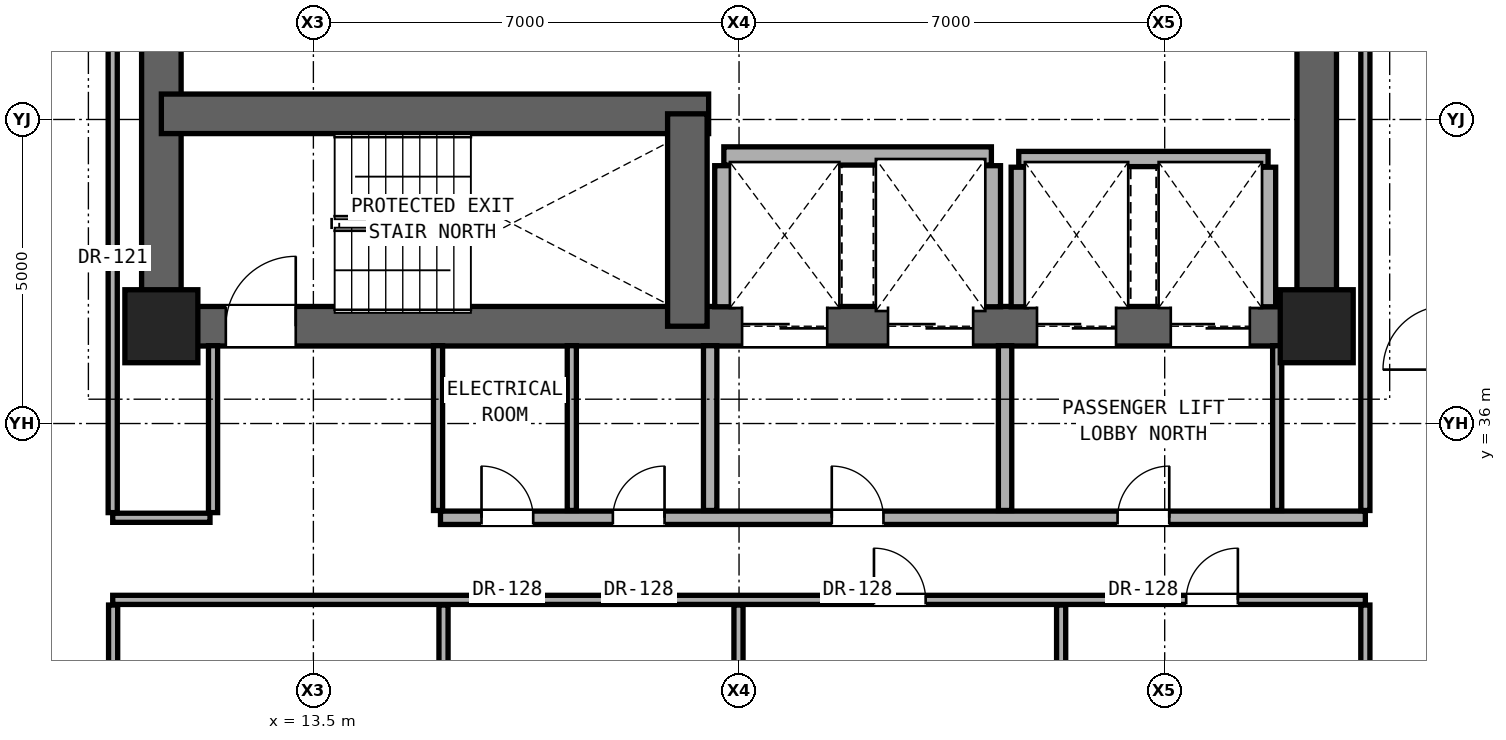
"""IFC4 building model, lengths in metres.
Left out: names, types, materials, properties, quantities, classifications, styles, units other than length and angle.
Written with IfcOpenShell. Run it as: python <this file> out.ifc"""

import sys

from ifc_helpers import new_model, si_unit, direction, frame, frame_2d, origin, origin_2d, place, context, subcontext, project, spatial, rectangle, extrude, element, fill, save


model = new_model("IFC4")
c1 = context("Model", 3, precision=1e-05, world=origin(), true_north=direction((0.0, 1.0)))
c2 = subcontext(c1, "Body", "Model", "MODEL_VIEW")
j1 = project(units=[si_unit("LENGTHUNIT", "METRE"), si_unit("PLANEANGLEUNIT", "RADIAN")], contexts=[c1])
p1 = place(None, origin())
s1 = spatial("IfcSite", under=j1, at=p1, CompositionType="ELEMENT")
p2 = place(p1, origin())
s2 = spatial("IfcBuilding", under=s1, at=p2, CompositionType="ELEMENT")
p3 = place(p2, frame((0.0, 0.0, 91.7)))
s3 = spatial("IfcBuildingStorey", under=s2, at=p3, CompositionType="ELEMENT", Elevation=91.7)
for number, where, z_axis, x_axis in (
    (1, (11.0, 37.6, 0.0), (0.0, 0.0, 1.0), (1.0, 0.0, 0.0)),
    (2, (30.0, 37.6, 0.0), (0.0, 0.0, 1.0), (1.0, 0.0, 0.0)),
):
    element("IfcColumn", number, at=place(p3, frame(where, z_axis=z_axis, x_axis=x_axis)), inside=s3, PredefinedType="COLUMN", context=c2, shape_type="SweptSolid", body=[
        extrude(rectangle(XDim=1.2, YDim=1.2, at=origin_2d()), origin(), (0.0, 0.0, 1.0), 3.3),
    ])
for number, where, z_axis, x_axis in (
    (3, (11.0, 37.6, 0.0), (0.0, 0.0, 1.0), (0.0, 1.0, 0.0)),
    (4, (30.0, 37.6, 0.0), (0.0, 0.0, 1.0), (0.0, 1.0, 0.0)),
):
    element("IfcWall", number, at=place(p3, frame(where, z_axis=z_axis, x_axis=x_axis)), inside=s3, PredefinedType="SHEAR", context=c2, shape_type="SweptSolid", body=[
        extrude(rectangle(XDim=6.0, YDim=0.65, at=frame_2d((3.0, 0.0))), origin(), (0.0, 0.0, 1.0), 3.08),
    ])
p4 = place(p3, frame((11.0, 37.6, 0.0), z_axis=(0.0, 0.0, 1.0), x_axis=(1.0, 0.0, 0.0)))
e5 = element("IfcWall", 5, at=p4, inside=s3, PredefinedType="SHEAR", context=c2, shape_type="SweptSolid", body=[
    extrude(rectangle(XDim=19.0, YDim=0.65, at=frame_2d((9.5, 0.0))), origin(), (0.0, 0.0, 1.0), 3.08),
])
p5 = place(p4, frame((1.06, 0.0, 0.0)))
e6 = element("IfcOpeningElement", 6, at=p5, cuts=e5, PredefinedType="OPENING", context=c2, shape_type="SweptSolid", body=[
    extrude(rectangle(XDim=1.15, YDim=2.2, at=frame_2d((0.575, 1.1))), frame((0.0, 0.335, 0.0), z_axis=(0.0, -1.0, 0.0), x_axis=(1.0, 0.0, 0.0)), (0.0, 0.0, 1.0), 0.67),
])
p6 = place(p4, frame((9.55, 0.0, 0.0)))
e7 = element("IfcOpeningElement", 7, at=p6, cuts=e5, PredefinedType="OPENING", context=c2, shape_type="SweptSolid", body=[
    extrude(rectangle(XDim=1.4, YDim=2.35, at=frame_2d((0.7, 1.175))), frame((0.0, 0.335, 0.0), z_axis=(0.0, -1.0, 0.0), x_axis=(1.0, 0.0, 0.0)), (0.0, 0.0, 1.0), 0.67),
])
p7 = place(p4, frame((11.95, 0.0, 0.0)))
e8 = element("IfcOpeningElement", 8, at=p7, cuts=e5, PredefinedType="OPENING", context=c2, shape_type="SweptSolid", body=[
    extrude(rectangle(XDim=1.4, YDim=2.35, at=frame_2d((0.7, 1.175))), frame((0.0, 0.335, 0.0), z_axis=(0.0, -1.0, 0.0), x_axis=(1.0, 0.0, 0.0)), (0.0, 0.0, 1.0), 0.67),
])
p8 = place(p4, frame((14.4, 0.0, 0.0)))
e9 = element("IfcOpeningElement", 9, at=p8, cuts=e5, PredefinedType="OPENING", context=c2, shape_type="SweptSolid", body=[
    extrude(rectangle(XDim=1.3, YDim=2.3, at=frame_2d((0.65, 1.15))), frame((0.0, 0.335, 0.0), z_axis=(0.0, -1.0, 0.0), x_axis=(1.0, 0.0, 0.0)), (0.0, 0.0, 1.0), 0.67),
])
p9 = place(p4, frame((16.6, 0.0, 0.0)))
e10 = element("IfcOpeningElement", 10, at=p9, cuts=e5, PredefinedType="OPENING", context=c2, shape_type="SweptSolid", body=[
    extrude(rectangle(XDim=1.3, YDim=2.3, at=frame_2d((0.65, 1.15))), frame((0.0, 0.335, 0.0), z_axis=(0.0, -1.0, 0.0), x_axis=(1.0, 0.0, 0.0)), (0.0, 0.0, 1.0), 0.67),
])
p10 = place(p3, frame((11.0, 41.093, 0.0), z_axis=(0.0, 0.0, 1.0), x_axis=(1.0, 0.0, 0.0)))
e11 = element("IfcWall", 11, at=p10, inside=s3, PredefinedType="SHEAR", context=c2, shape_type="SweptSolid", body=[
    extrude(rectangle(XDim=9.0, YDim=0.65, at=frame_2d((4.5, 0.0))), origin(), (0.0, 0.0, 1.0), 3.08),
])
p11 = place(p3, frame((19.65, 37.6, 0.0), z_axis=(0.0, 0.0, 1.0), x_axis=(0.0, 1.0, 0.0)))
e12 = element("IfcWall", 12, at=p11, inside=s3, PredefinedType="SHEAR", context=c2, shape_type="SweptSolid", body=[
    extrude(rectangle(XDim=3.493, YDim=0.65, at=frame_2d((1.747, 0.0))), origin(), (0.0, 0.0, 1.0), 3.08),
])
p12 = place(p3, frame((10.2, 33.1, 0.0), z_axis=(0.0, 0.0, 1.0), x_axis=(1.0, 0.0, 0.0)))
e13 = element("IfcWall", 13, at=p12, inside=s3, PredefinedType="PARTITIONING", context=c2, shape_type="SweptSolid", body=[
    extrude(rectangle(XDim=20.6, YDim=0.15, at=frame_2d((10.3, 0.0))), origin(), (0.0, 0.0, 1.0), 2.124),
])
p13 = place(p12, frame((12.519, 0.0, 0.0)))
e14 = element("IfcOpeningElement", 14, at=p13, cuts=e13, PredefinedType="OPENING", context=c2, shape_type="SweptSolid", body=[
    extrude(rectangle(XDim=0.85, YDim=2.01, at=frame_2d((0.425, 1.005))), frame((0.0, 0.085, 0.0), z_axis=(0.0, -1.0, 0.0), x_axis=(1.0, 0.0, 0.0)), (0.0, 0.0, 1.0), 0.17),
])
p14 = place(p12, frame((17.654, 0.0, 0.0)))
e15 = element("IfcOpeningElement", 15, at=p14, cuts=e13, PredefinedType="OPENING", context=c2, shape_type="SweptSolid", body=[
    extrude(rectangle(XDim=0.85, YDim=2.01, at=frame_2d((0.425, 1.005))), frame((0.0, 0.085, 0.0), z_axis=(0.0, -1.0, 0.0), x_axis=(1.0, 0.0, 0.0)), (0.0, 0.0, 1.0), 0.17),
])
p15 = place(p3, frame((10.2, 34.45, 0.0), z_axis=(0.0, 0.0, 1.0), x_axis=(1.0, 0.0, 0.0)))
e16 = element("IfcWall", 16, at=p15, inside=s3, PredefinedType="PARTITIONING", context=c2, shape_type="SweptSolid", body=[
    extrude(rectangle(XDim=1.6, YDim=0.15, at=frame_2d((0.8, 0.0))), origin(), (0.0, 0.0, 1.0), 2.124),
])
p16 = place(p3, frame((15.59, 34.45, 0.0), z_axis=(0.0, 0.0, 1.0), x_axis=(1.0, 0.0, 0.0)))
e17 = element("IfcWall", 17, at=p16, inside=s3, PredefinedType="SOLIDWALL", context=c2, shape_type="SweptSolid", body=[
    extrude(rectangle(XDim=15.21, YDim=0.22, at=frame_2d((7.605, 0.0))), origin(), (0.0, 0.0, 1.0), 2.124),
])
p17 = place(p16, frame((6.435, 0.0, 0.0)))
e18 = element("IfcOpeningElement", 18, at=p17, cuts=e17, PredefinedType="OPENING", context=c2, shape_type="SweptSolid", body=[
    extrude(rectangle(XDim=0.85, YDim=2.01, at=frame_2d((0.425, 1.005))), frame((0.0, 0.12, 0.0), z_axis=(0.0, -1.0, 0.0), x_axis=(1.0, 0.0, 0.0)), (0.0, 0.0, 1.0), 0.24),
])
p18 = place(p16, frame((11.135, 0.0, 0.0)))
e19 = element("IfcOpeningElement", 19, at=p18, cuts=e17, PredefinedType="OPENING", context=c2, shape_type="SweptSolid", body=[
    extrude(rectangle(XDim=0.85, YDim=2.01, at=frame_2d((0.425, 1.005))), frame((0.0, 0.12, 0.0), z_axis=(0.0, -1.0, 0.0), x_axis=(1.0, 0.0, 0.0)), (0.0, 0.0, 1.0), 0.24),
])
p19 = place(p16, frame((0.675, 0.0, 0.0)))
e20 = element("IfcOpeningElement", 20, at=p19, cuts=e17, PredefinedType="OPENING", context=c2, shape_type="SweptSolid", body=[
    extrude(rectangle(XDim=0.85, YDim=2.01, at=frame_2d((0.425, 1.005))), frame((0.0, 0.12, 0.0), z_axis=(0.0, -1.0, 0.0), x_axis=(1.0, 0.0, 0.0)), (0.0, 0.0, 1.0), 0.24),
])
p20 = place(p16, frame((2.835, 0.0, 0.0)))
e21 = element("IfcOpeningElement", 21, at=p20, cuts=e17, PredefinedType="OPENING", context=c2, shape_type="SweptSolid", body=[
    extrude(rectangle(XDim=0.85, YDim=2.01, at=frame_2d((0.425, 1.005))), frame((0.0, 0.12, 0.0), z_axis=(0.0, -1.0, 0.0), x_axis=(1.0, 0.0, 0.0)), (0.0, 0.0, 1.0), 0.24),
])
p21 = place(p3, frame((25.1, 40.35, 0.0), z_axis=(0.0, 0.0, 1.0), x_axis=(1.0, 0.0, 0.0)))
e22 = element("IfcWall", 22, at=p21, inside=s3, PredefinedType="SOLIDWALL", context=c2, shape_type="SweptSolid", body=[
    extrude(rectangle(XDim=4.1, YDim=0.25, at=frame_2d((2.05, 0.0))), origin(), (0.0, 0.0, 1.0), 3.08),
])
p22 = place(p3, frame((20.25, 40.4, 0.0), z_axis=(0.0, 0.0, 1.0), x_axis=(1.0, 0.0, 0.0)))
e23 = element("IfcWall", 23, at=p22, inside=s3, PredefinedType="SOLIDWALL", context=c2, shape_type="SweptSolid", body=[
    extrude(rectangle(XDim=4.4, YDim=0.3, at=frame_2d((2.2, 0.0))), origin(), (0.0, 0.0, 1.0), 3.08),
])
p23 = place(p3, frame((10.207, 22.935, 0.0), z_axis=(0.0, 0.0, 1.0), x_axis=(0.0, 1.0, 0.0)))
e24 = element("IfcWall", 24, at=p23, inside=s3, PredefinedType="PARTITIONING", context=c2, shape_type="SweptSolid", body=[
    extrude(rectangle(XDim=10.08, YDim=0.15, at=frame_2d((5.04, 0.0))), origin(), (0.0, 0.0, 1.0), 2.299),
])
p24 = place(p23, frame((4.565, 0.0, 0.0)))
e25 = element("IfcOpeningElement", 25, at=p24, cuts=e24, PredefinedType="OPENING", context=c2, shape_type="SweptSolid", body=[
    extrude(rectangle(XDim=0.95, YDim=2.15, at=frame_2d((0.475, 1.075))), frame((0.0, 0.085, 0.0), z_axis=(0.0, -1.0, 0.0), x_axis=(1.0, 0.0, 0.0)), (0.0, 0.0, 1.0), 0.17),
])
p25 = place(p3, frame((10.2, 34.535, 0.0), z_axis=(0.0, 0.0, 1.0), x_axis=(0.0, 1.0, 0.0)))
e26 = element("IfcWall", 26, at=p25, inside=s3, PredefinedType="PARTITIONING", context=c2, shape_type="SweptSolid", body=[
    extrude(rectangle(XDim=9.13, YDim=0.15, at=frame_2d((4.565, 0.0))), origin(), (0.0, 0.0, 1.0), 2.456),
])
p26 = place(p3, frame((11.85, 34.535, 0.0), z_axis=(0.0, 0.0, 1.0), x_axis=(0.0, 1.0, 0.0)))
e27 = element("IfcWall", 27, at=p26, inside=s3, PredefinedType="PARTITIONING", context=c2, shape_type="SweptSolid", body=[
    extrude(rectangle(XDim=2.745, YDim=0.15, at=frame_2d((1.373, 0.0))), origin(), (0.0, 0.0, 1.0), 3.08),
])
p27 = place(p3, frame((15.64, 22.935, 0.0), z_axis=(0.0, 0.0, 1.0), x_axis=(0.0, 1.0, 0.0)))
e28 = element("IfcWall", 28, at=p27, inside=s3, PredefinedType="PARTITIONING", context=c2, shape_type="SweptSolid", body=[
    extrude(rectangle(XDim=10.08, YDim=0.15, at=frame_2d((5.04, 0.0))), origin(), (0.0, 0.0, 1.0), 2.124),
])
p28 = place(p3, frame((15.55, 34.57, 0.0), z_axis=(0.0, 0.0, 1.0), x_axis=(0.0, 1.0, 0.0)))
e29 = element("IfcWall", 29, at=p28, inside=s3, PredefinedType="PARTITIONING", context=c2, shape_type="SweptSolid", body=[
    extrude(rectangle(XDim=2.71, YDim=0.15, at=frame_2d((1.355, 0.0))), origin(), (0.0, 0.0, 1.0), 2.609),
])
p29 = place(p3, frame((17.75, 34.57, 0.0), z_axis=(0.0, 0.0, 1.0), x_axis=(0.0, 1.0, 0.0)))
e30 = element("IfcWall", 30, at=p29, inside=s3, PredefinedType="PARTITIONING", context=c2, shape_type="SweptSolid", body=[
    extrude(rectangle(XDim=2.71, YDim=0.15, at=frame_2d((1.355, 0.0))), origin(), (0.0, 0.0, 1.0), 3.08),
])
p30 = place(p3, frame((20.025, 34.57, 0.0), z_axis=(0.0, 0.0, 1.0), x_axis=(0.0, 1.0, 0.0)))
e31 = element("IfcWall", 31, at=p30, inside=s3, PredefinedType="SOLIDWALL", context=c2, shape_type="SweptSolid", body=[
    extrude(rectangle(XDim=2.71, YDim=0.22, at=frame_2d((1.355, 0.0))), origin(), (0.0, 0.0, 1.0), 3.08),
])
p31 = place(p3, frame((20.25, 37.92, 0.0), z_axis=(0.0, 0.0, 1.0), x_axis=(0.0, 1.0, 0.0)))
e32 = element("IfcWall", 32, at=p31, inside=s3, PredefinedType="SOLIDWALL", context=c2, shape_type="SweptSolid", body=[
    extrude(rectangle(XDim=2.32, YDim=0.3, at=frame_2d((1.16, 0.0))), origin(), (0.0, 0.0, 1.0), 3.08),
])
p32 = place(p3, frame((20.491, 19.985, 0.0), z_axis=(0.0, 0.0, 1.0), x_axis=(0.0, 1.0, 0.0)))
e33 = element("IfcWall", 33, at=p32, inside=s3, PredefinedType="PARTITIONING", context=c2, shape_type="SweptSolid", body=[
    extrude(rectangle(XDim=13.03, YDim=0.15, at=frame_2d((6.515, 0.0))), origin(), (0.0, 0.0, 1.0), 2.124),
])
p33 = place(p3, frame((24.65, 37.92, 0.0), z_axis=(0.0, 0.0, 1.0), x_axis=(0.0, 1.0, 0.0)))
e34 = element("IfcWall", 34, at=p33, inside=s3, PredefinedType="SOLIDWALL", context=c2, shape_type="SweptSolid", body=[
    extrude(rectangle(XDim=2.32, YDim=0.3, at=frame_2d((1.16, 0.0))), origin(), (0.0, 0.0, 1.0), 3.08),
])
p34 = place(p3, frame((24.875, 34.57, 0.0), z_axis=(0.0, 0.0, 1.0), x_axis=(0.0, 1.0, 0.0)))
e35 = element("IfcWall", 35, at=p34, inside=s3, PredefinedType="SOLIDWALL", context=c2, shape_type="SweptSolid", body=[
    extrude(rectangle(XDim=2.71, YDim=0.22, at=frame_2d((1.355, 0.0))), origin(), (0.0, 0.0, 1.0), 3.08),
])
p35 = place(p3, frame((25.1, 37.92, 0.0), z_axis=(0.0, 0.0, 1.0), x_axis=(0.0, 1.0, 0.0)))
e36 = element("IfcWall", 36, at=p35, inside=s3, PredefinedType="SOLIDWALL", context=c2, shape_type="SweptSolid", body=[
    extrude(rectangle(XDim=2.295, YDim=0.25, at=frame_2d((1.147, 0.0))), origin(), (0.0, 0.0, 1.0), 3.08),
])
p36 = place(p3, frame((25.797, 19.985, 0.0), z_axis=(0.0, 0.0, 1.0), x_axis=(0.0, 1.0, 0.0)))
e37 = element("IfcWall", 37, at=p36, inside=s3, PredefinedType="PARTITIONING", context=c2, shape_type="SweptSolid", body=[
    extrude(rectangle(XDim=13.03, YDim=0.15, at=frame_2d((6.515, 0.0))), origin(), (0.0, 0.0, 1.0), 2.124),
])
p37 = place(p3, frame((29.35, 34.57, 0.0), z_axis=(0.0, 0.0, 1.0), x_axis=(0.0, 1.0, 0.0)))
e38 = element("IfcWall", 38, at=p37, inside=s3, PredefinedType="PARTITIONING", context=c2, shape_type="SweptSolid", body=[
    extrude(rectangle(XDim=2.71, YDim=0.15, at=frame_2d((1.355, 0.0))), origin(), (0.0, 0.0, 1.0), 3.08),
])
p38 = place(p3, frame((29.2, 37.92, 0.0), z_axis=(0.0, 0.0, 1.0), x_axis=(0.0, 1.0, 0.0)))
e39 = element("IfcWall", 39, at=p38, inside=s3, PredefinedType="SOLIDWALL", context=c2, shape_type="SweptSolid", body=[
    extrude(rectangle(XDim=2.295, YDim=0.25, at=frame_2d((1.147, 0.0))), origin(), (0.0, 0.0, 1.0), 3.08),
])
p39 = place(p3, frame((30.8, 19.985, 0.0), z_axis=(0.0, 0.0, 1.0), x_axis=(0.0, 1.0, 0.0)))
e40 = element("IfcWall", 40, at=p39, inside=s3, PredefinedType="PARTITIONING", context=c2, shape_type="SweptSolid", body=[
    extrude(rectangle(XDim=13.03, YDim=0.15, at=frame_2d((6.515, 0.0))), origin(), (0.0, 0.0, 1.0), 2.299),
])
p40 = place(p3, frame((30.8, 34.57, 0.0), z_axis=(0.0, 0.0, 1.0), x_axis=(0.0, 1.0, 0.0)))
e41 = element("IfcWall", 41, at=p40, inside=s3, PredefinedType="PARTITIONING", context=c2, shape_type="SweptSolid", body=[
    extrude(rectangle(XDim=9.095, YDim=0.15, at=frame_2d((4.547, 0.0))), origin(), (0.0, 0.0, 1.0), 2.456),
])
p41 = place(p5, origin())
e42 = element("IfcDoor", 42, at=p41, inside=s3, OperationType="SINGLE_SWING_RIGHT", PredefinedType="DOOR", context=c2, shape_type="SweptSolid", body=[
    extrude(rectangle(XDim=1.15, YDim=2.2, at=frame_2d((0.575, 1.1))), frame((0.0, 0.025, 0.0), z_axis=(0.0, -1.0, 0.0), x_axis=(1.0, 0.0, 0.0)), (0.0, 0.0, 1.0), 0.05),
])
fill(e6, e42)
p42 = place(p17, origin())
e43 = element("IfcDoor", 43, at=p42, inside=s3, OperationType="SINGLE_SWING_LEFT", PredefinedType="DOOR", context=c2, shape_type="SweptSolid", body=[
    extrude(rectangle(XDim=0.85, YDim=2.01, at=frame_2d((0.425, 1.005))), frame((0.0, 0.025, 0.0), z_axis=(0.0, -1.0, 0.0), x_axis=(1.0, 0.0, 0.0)), (0.0, 0.0, 1.0), 0.05),
])
fill(e18, e43)
p43 = place(p18, origin())
e44 = element("IfcDoor", 44, at=p43, inside=s3, OperationType="SINGLE_SWING_RIGHT", PredefinedType="DOOR", context=c2, shape_type="SweptSolid", body=[
    extrude(rectangle(XDim=0.85, YDim=2.01, at=frame_2d((0.425, 1.005))), frame((0.0, 0.025, 0.0), z_axis=(0.0, -1.0, 0.0), x_axis=(1.0, 0.0, 0.0)), (0.0, 0.0, 1.0), 0.05),
])
fill(e19, e44)
p44 = place(p19, origin())
e45 = element("IfcDoor", 45, at=p44, inside=s3, OperationType="SINGLE_SWING_LEFT", PredefinedType="DOOR", context=c2, shape_type="SweptSolid", body=[
    extrude(rectangle(XDim=0.85, YDim=2.01, at=frame_2d((0.425, 1.005))), frame((0.0, 0.025, 0.0), z_axis=(0.0, -1.0, 0.0), x_axis=(1.0, 0.0, 0.0)), (0.0, 0.0, 1.0), 0.05),
])
fill(e20, e45)
p45 = place(p20, origin())
e46 = element("IfcDoor", 46, at=p45, inside=s3, OperationType="SINGLE_SWING_RIGHT", PredefinedType="DOOR", context=c2, shape_type="SweptSolid", body=[
    extrude(rectangle(XDim=0.85, YDim=2.01, at=frame_2d((0.425, 1.005))), frame((0.0, 0.025, 0.0), z_axis=(0.0, -1.0, 0.0), x_axis=(1.0, 0.0, 0.0)), (0.0, 0.0, 1.0), 0.05),
])
fill(e21, e46)
p46 = place(p13, origin())
e47 = element("IfcDoor", 47, at=p46, inside=s3, OperationType="SINGLE_SWING_LEFT", PredefinedType="DOOR", context=c2, shape_type="SweptSolid", body=[
    extrude(rectangle(XDim=0.85, YDim=2.01, at=frame_2d((0.425, 1.005))), frame((0.0, 0.025, 0.0), z_axis=(0.0, -1.0, 0.0), x_axis=(1.0, 0.0, 0.0)), (0.0, 0.0, 1.0), 0.05),
])
fill(e14, e47)
p47 = place(p14, origin())
e48 = element("IfcDoor", 48, at=p47, inside=s3, OperationType="SINGLE_SWING_RIGHT", PredefinedType="DOOR", context=c2, shape_type="SweptSolid", body=[
    extrude(rectangle(XDim=0.85, YDim=2.01, at=frame_2d((0.425, 1.005))), frame((0.0, 0.025, 0.0), z_axis=(0.0, -1.0, 0.0), x_axis=(1.0, 0.0, 0.0)), (0.0, 0.0, 1.0), 0.05),
])
fill(e15, e48)
p48 = place(p6, origin())
e49 = element("IfcDoor", 49, at=p48, inside=s3, OperationType="DOUBLE_DOOR_SLIDING", PredefinedType="DOOR", context=c2, shape_type="SweptSolid", body=[
    extrude(rectangle(XDim=1.4, YDim=2.35, at=frame_2d((0.7, 1.175))), frame((0.0, 0.025, 0.0), z_axis=(0.0, -1.0, 0.0), x_axis=(1.0, 0.0, 0.0)), (0.0, 0.0, 1.0), 0.05),
])
fill(e7, e49)
p49 = place(p7, origin())
e50 = element("IfcDoor", 50, at=p49, inside=s3, OperationType="DOUBLE_DOOR_SLIDING", PredefinedType="DOOR", context=c2, shape_type="SweptSolid", body=[
    extrude(rectangle(XDim=1.4, YDim=2.35, at=frame_2d((0.7, 1.175))), frame((0.0, 0.025, 0.0), z_axis=(0.0, -1.0, 0.0), x_axis=(1.0, 0.0, 0.0)), (0.0, 0.0, 1.0), 0.05),
])
fill(e8, e50)
p50 = place(p8, origin())
e51 = element("IfcDoor", 51, at=p50, inside=s3, OperationType="DOUBLE_DOOR_SLIDING", PredefinedType="DOOR", context=c2, shape_type="SweptSolid", body=[
    extrude(rectangle(XDim=1.3, YDim=2.3, at=frame_2d((0.65, 1.15))), frame((0.0, 0.025, 0.0), z_axis=(0.0, -1.0, 0.0), x_axis=(1.0, 0.0, 0.0)), (0.0, 0.0, 1.0), 0.05),
])
fill(e9, e51)
p51 = place(p9, origin())
e52 = element("IfcDoor", 52, at=p51, inside=s3, OperationType="DOUBLE_DOOR_SLIDING", PredefinedType="DOOR", context=c2, shape_type="SweptSolid", body=[
    extrude(rectangle(XDim=1.3, YDim=2.3, at=frame_2d((0.65, 1.15))), frame((0.0, 0.025, 0.0), z_axis=(0.0, -1.0, 0.0), x_axis=(1.0, 0.0, 0.0)), (0.0, 0.0, 1.0), 0.05),
])
fill(e10, e52)
save(model, sys.argv[1])
